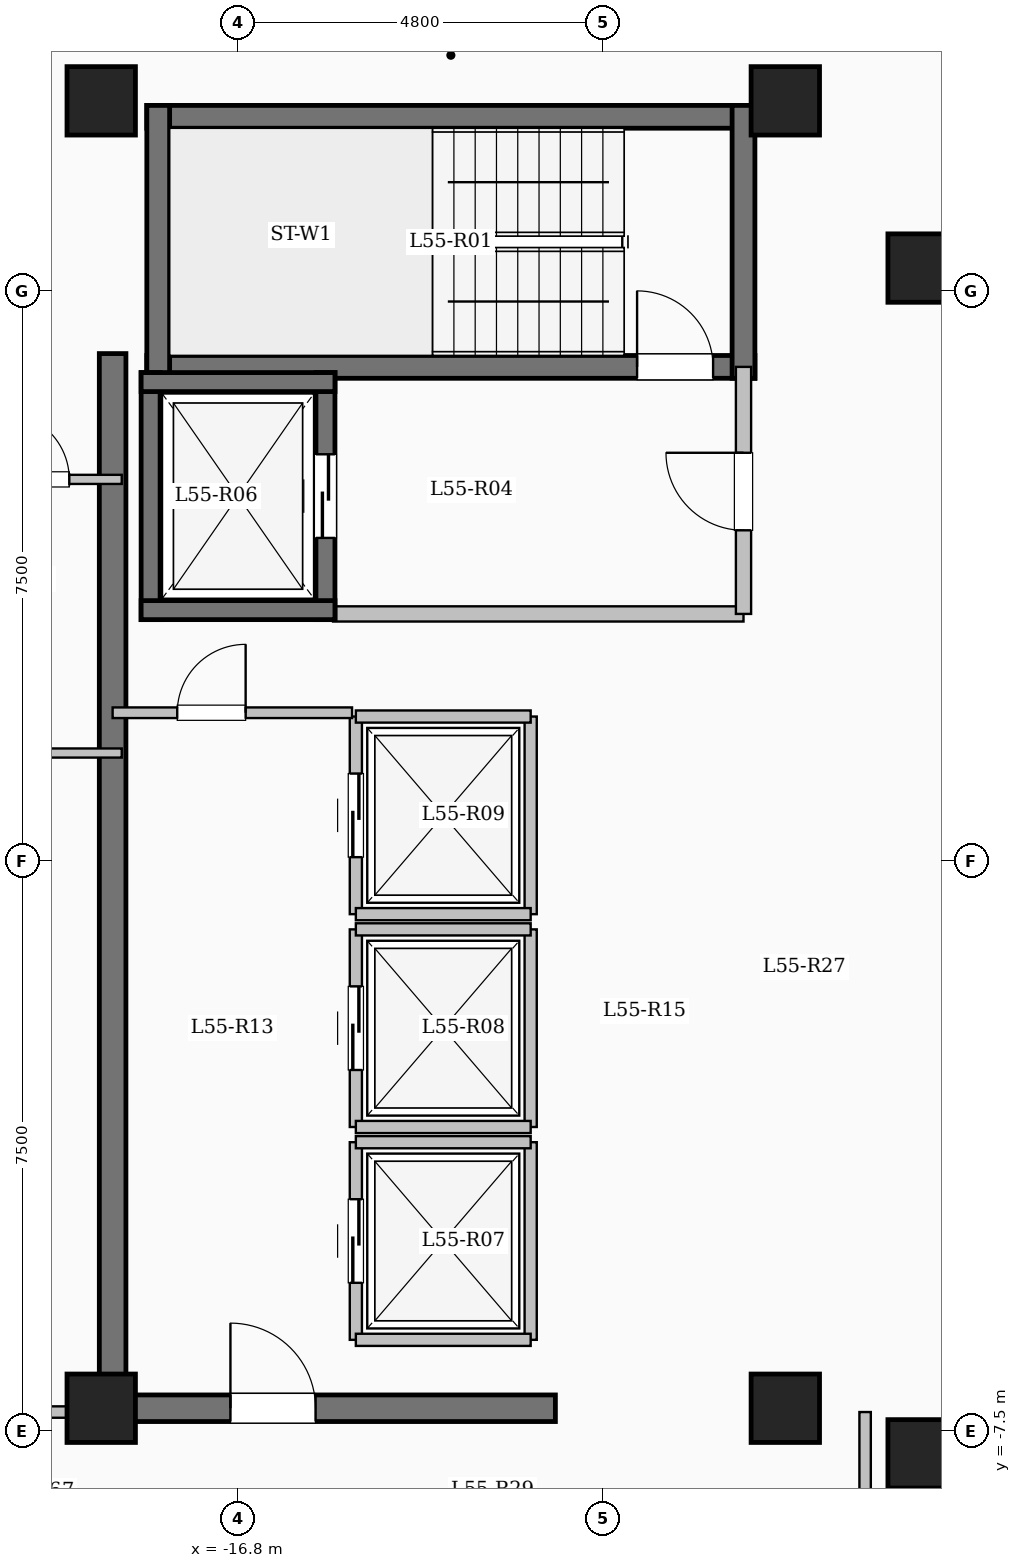
"""IFC4 building model, lengths in metres.
Left out: names, types, materials, properties, quantities, classifications, styles, units other than length and angle.
Written with IfcOpenShell. Run it as: python <this file> out.ifc"""

import sys

from ifc_helpers import new_model, si_unit, direction, frame, frame_2d, origin, origin_2d, place, context, subcontext, project, spatial, rectangle, extrude, element, fill, save


model = new_model("IFC4")
c1 = context("Model", 3, precision=1e-05, world=origin(), true_north=direction((0.0, 1.0)))
c2 = subcontext(c1, "Body", "Model", "MODEL_VIEW")
j1 = project(units=[si_unit("LENGTHUNIT", "METRE"), si_unit("PLANEANGLEUNIT", "RADIAN")], contexts=[c1])
p1 = place(None, origin())
s1 = spatial("IfcSite", under=j1, at=p1, CompositionType="ELEMENT")
p2 = place(p1, origin())
s2 = spatial("IfcBuilding", under=s1, at=p2, CompositionType="ELEMENT")
p3 = place(p2, frame((0.0, 0.0, 203.65)))
s3 = spatial("IfcBuildingStorey", under=s2, at=p3, CompositionType="ELEMENT", Elevation=203.65)
for number, where, z_axis, x_axis in (
    (1, (-7.8, -7.8, 0.0), (0.0, 0.0, 1.0), (1.0, 0.0, 0.0)),
    (2, (-7.8, 7.8, 0.0), (0.0, 0.0, 1.0), (1.0, 0.0, 0.0)),
    (3, (-9.6, -7.2, 0.0), (0.0, 0.0, 1.0), (1.0, 0.0, 0.0)),
    (4, (-9.6, 10.0, 0.0), (0.0, 0.0, 1.0), (1.0, 0.0, 0.0)),
    (5, (-18.6, -7.2, 0.0), (0.0, 0.0, 1.0), (1.0, 0.0, 0.0)),
    (6, (-18.6, 10.0, 0.0), (0.0, 0.0, 1.0), (1.0, 0.0, 0.0)),
):
    element("IfcColumn", number, at=place(p3, frame(where, z_axis=z_axis, x_axis=x_axis)), inside=s3, PredefinedType="COLUMN", context=c2, shape_type="SweptSolid", body=[
        extrude(rectangle(XDim=0.9, YDim=0.9, at=origin_2d()), origin(), (0.0, 0.0, 1.0), 3.35),
    ])
p4 = place(p3, frame((-18.0, 9.79, 0.0), z_axis=(0.0, 0.0, 1.0), x_axis=(1.0, 0.0, 0.0)))
e7 = element("IfcWall", 7, at=p4, inside=s3, PredefinedType="SHEAR", context=c2, shape_type="SweptSolid", body=[
    extrude(rectangle(XDim=8.0, YDim=0.3, at=frame_2d((4.0, 0.0))), origin(), (0.0, 0.0, 1.0), 3.35),
])
p5 = place(p3, frame((-18.0, 6.5, 0.0), z_axis=(0.0, 0.0, 1.0), x_axis=(1.0, 0.0, 0.0)))
e8 = element("IfcWall", 8, at=p5, inside=s3, PredefinedType="SHEAR", context=c2, shape_type="SweptSolid", body=[
    extrude(rectangle(XDim=8.0, YDim=0.3, at=frame_2d((4.0, 0.0))), origin(), (0.0, 0.0, 1.0), 3.35),
])
p6 = place(p5, frame((6.45, 0.0, 0.0)))
e9 = element("IfcOpeningElement", 9, at=p6, cuts=e8, PredefinedType="OPENING", context=c2, shape_type="SweptSolid", body=[
    extrude(rectangle(XDim=1.0, YDim=2.15, at=frame_2d((0.5, 1.075))), frame((0.0, 0.16, 0.0), z_axis=(0.0, -1.0, 0.0), x_axis=(1.0, 0.0, 0.0)), (0.0, 0.0, 1.0), 0.32),
])
for number, where, z_axis, x_axis in (
    (10, (-17.85, 6.35, 0.0), (0.0, 0.0, 1.0), (0.0, 1.0, 0.0)),
    (11, (-10.15, 6.35, 0.0), (0.0, 0.0, 1.0), (0.0, 1.0, 0.0)),
):
    element("IfcWall", number, at=place(p3, frame(where, z_axis=z_axis, x_axis=x_axis)), inside=s3, PredefinedType="SHEAR", context=c2, shape_type="SweptSolid", body=[
        extrude(rectangle(XDim=3.59, YDim=0.3, at=frame_2d((1.795, 0.0))), origin(), (0.0, 0.0, 1.0), 3.35),
    ])
p7 = place(p3, frame((-15.55, 3.25, 0.0), z_axis=(0.0, 0.0, 1.0), x_axis=(1.0, 0.0, 0.0)))
e12 = element("IfcWall", 12, at=p7, inside=s3, PredefinedType="SOLIDWALL", context=c2, shape_type="SweptSolid", body=[
    extrude(rectangle(XDim=5.4, YDim=0.2, at=frame_2d((2.7, 0.0))), origin(), (0.0, 0.0, 1.0), 3.1),
])
p8 = place(p3, frame((-10.15, 3.25, 0.0), z_axis=(0.0, 0.0, 1.0), x_axis=(0.0, 1.0, 0.0)))
e13 = element("IfcWall", 13, at=p8, inside=s3, PredefinedType="SOLIDWALL", context=c2, shape_type="SweptSolid", body=[
    extrude(rectangle(XDim=3.25, YDim=0.2, at=frame_2d((1.625, 0.0))), origin(), (0.0, 0.0, 1.0), 3.1),
])
p9 = place(p8, frame((1.1, 0.0, 0.0)))
e14 = element("IfcOpeningElement", 14, at=p9, cuts=e13, PredefinedType="OPENING", context=c2, shape_type="SweptSolid", body=[
    extrude(rectangle(XDim=1.02, YDim=2.15, at=frame_2d((0.51, 1.075))), frame((0.0, 0.11, 0.0), z_axis=(0.0, -1.0, 0.0), x_axis=(1.0, 0.0, 0.0)), (0.0, 0.0, 1.0), 0.22),
])
p10 = place(p3, frame((-17.95, 3.175, 0.0), z_axis=(0.0, 0.0, 1.0), x_axis=(0.0, 1.0, 0.0)))
e15 = element("IfcWall", 15, at=p10, inside=s3, PredefinedType="SHEAR", context=c2, shape_type="SweptSolid", body=[
    extrude(rectangle(XDim=3.25, YDim=0.25, at=frame_2d((1.625, 0.0))), origin(), (0.0, 0.0, 1.0), 3.35),
])
p11 = place(p3, frame((-15.65, 3.175, 0.0), z_axis=(0.0, 0.0, 1.0), x_axis=(0.0, 1.0, 0.0)))
e16 = element("IfcWall", 16, at=p11, inside=s3, PredefinedType="SHEAR", context=c2, shape_type="SweptSolid", body=[
    extrude(rectangle(XDim=3.25, YDim=0.25, at=frame_2d((1.625, 0.0))), origin(), (0.0, 0.0, 1.0), 3.35),
])
p12 = place(p11, frame((1.075, 0.0, 0.0)))
e17 = element("IfcOpeningElement", 17, at=p12, cuts=e16, PredefinedType="OPENING", context=c2, shape_type="SweptSolid", body=[
    extrude(rectangle(XDim=1.1, YDim=2.15, at=frame_2d((0.55, 1.075))), frame((0.0, 0.135, 0.0), z_axis=(0.0, -1.0, 0.0), x_axis=(1.0, 0.0, 0.0)), (0.0, 0.0, 1.0), 0.27),
])
for number, where, z_axis, x_axis in (
    (18, (-18.075, 3.3, 0.0), (0.0, 0.0, 1.0), (1.0, 0.0, 0.0)),
    (19, (-18.075, 6.3, 0.0), (0.0, 0.0, 1.0), (1.0, 0.0, 0.0)),
):
    element("IfcWall", number, at=place(p3, frame(where, z_axis=z_axis, x_axis=x_axis)), inside=s3, PredefinedType="SHEAR", context=c2, shape_type="SweptSolid", body=[
        extrude(rectangle(XDim=2.55, YDim=0.25, at=frame_2d((1.275, 0.0))), origin(), (0.0, 0.0, 1.0), 3.35),
    ])
p13 = place(p3, frame((-15.25, -6.3, 0.0), z_axis=(0.0, 0.0, 1.0), x_axis=(0.0, 1.0, 0.0)))
e20 = element("IfcWall", 20, at=p13, inside=s3, PredefinedType="SOLIDWALL", context=c2, shape_type="SweptSolid", body=[
    extrude(rectangle(XDim=2.6, YDim=0.16, at=frame_2d((1.3, 0.0))), origin(), (0.0, 0.0, 1.0), 3.1),
])
p14 = place(p13, frame((0.75, 0.0, 0.0)))
e21 = element("IfcOpeningElement", 21, at=p14, cuts=e20, PredefinedType="OPENING", context=c2, shape_type="SweptSolid", body=[
    extrude(rectangle(XDim=1.1, YDim=2.15, at=frame_2d((0.55, 1.075))), frame((0.0, 0.09, 0.0), z_axis=(0.0, -1.0, 0.0), x_axis=(1.0, 0.0, 0.0)), (0.0, 0.0, 1.0), 0.18),
])
p15 = place(p3, frame((-12.95, -6.3, 0.0), z_axis=(0.0, 0.0, 1.0), x_axis=(0.0, 1.0, 0.0)))
e22 = element("IfcWall", 22, at=p15, inside=s3, PredefinedType="SOLIDWALL", context=c2, shape_type="SweptSolid", body=[
    extrude(rectangle(XDim=2.6, YDim=0.16, at=frame_2d((1.3, 0.0))), origin(), (0.0, 0.0, 1.0), 3.1),
])
for number, where, z_axis, x_axis in (
    (23, (-15.25, -6.3, 0.0), (0.0, 0.0, 1.0), (1.0, 0.0, 0.0)),
    (24, (-15.25, -3.7, 0.0), (0.0, 0.0, 1.0), (1.0, 0.0, 0.0)),
):
    element("IfcWall", number, at=place(p3, frame(where, z_axis=z_axis, x_axis=x_axis)), inside=s3, PredefinedType="SOLIDWALL", context=c2, shape_type="SweptSolid", body=[
        extrude(rectangle(XDim=2.3, YDim=0.16, at=frame_2d((1.15, 0.0))), origin(), (0.0, 0.0, 1.0), 3.1),
    ])
p16 = place(p3, frame((-15.25, -3.5, 0.0), z_axis=(0.0, 0.0, 1.0), x_axis=(0.0, 1.0, 0.0)))
e25 = element("IfcWall", 25, at=p16, inside=s3, PredefinedType="SOLIDWALL", context=c2, shape_type="SweptSolid", body=[
    extrude(rectangle(XDim=2.6, YDim=0.16, at=frame_2d((1.3, 0.0))), origin(), (0.0, 0.0, 1.0), 3.1),
])
p17 = place(p16, frame((0.75, 0.0, 0.0)))
e26 = element("IfcOpeningElement", 26, at=p17, cuts=e25, PredefinedType="OPENING", context=c2, shape_type="SweptSolid", body=[
    extrude(rectangle(XDim=1.1, YDim=2.15, at=frame_2d((0.55, 1.075))), frame((0.0, 0.09, 0.0), z_axis=(0.0, -1.0, 0.0), x_axis=(1.0, 0.0, 0.0)), (0.0, 0.0, 1.0), 0.18),
])
p18 = place(p3, frame((-12.95, -3.5, 0.0), z_axis=(0.0, 0.0, 1.0), x_axis=(0.0, 1.0, 0.0)))
e27 = element("IfcWall", 27, at=p18, inside=s3, PredefinedType="SOLIDWALL", context=c2, shape_type="SweptSolid", body=[
    extrude(rectangle(XDim=2.6, YDim=0.16, at=frame_2d((1.3, 0.0))), origin(), (0.0, 0.0, 1.0), 3.1),
])
for number, where, z_axis, x_axis in (
    (28, (-15.25, -3.5, 0.0), (0.0, 0.0, 1.0), (1.0, 0.0, 0.0)),
    (29, (-15.25, -0.9, 0.0), (0.0, 0.0, 1.0), (1.0, 0.0, 0.0)),
):
    element("IfcWall", number, at=place(p3, frame(where, z_axis=z_axis, x_axis=x_axis)), inside=s3, PredefinedType="SOLIDWALL", context=c2, shape_type="SweptSolid", body=[
        extrude(rectangle(XDim=2.3, YDim=0.16, at=frame_2d((1.15, 0.0))), origin(), (0.0, 0.0, 1.0), 3.1),
    ])
p19 = place(p3, frame((-15.25, -0.7, 0.0), z_axis=(0.0, 0.0, 1.0), x_axis=(0.0, 1.0, 0.0)))
e30 = element("IfcWall", 30, at=p19, inside=s3, PredefinedType="SOLIDWALL", context=c2, shape_type="SweptSolid", body=[
    extrude(rectangle(XDim=2.6, YDim=0.16, at=frame_2d((1.3, 0.0))), origin(), (0.0, 0.0, 1.0), 3.1),
])
p20 = place(p19, frame((0.75, 0.0, 0.0)))
e31 = element("IfcOpeningElement", 31, at=p20, cuts=e30, PredefinedType="OPENING", context=c2, shape_type="SweptSolid", body=[
    extrude(rectangle(XDim=1.1, YDim=2.15, at=frame_2d((0.55, 1.075))), frame((0.0, 0.09, 0.0), z_axis=(0.0, -1.0, 0.0), x_axis=(1.0, 0.0, 0.0)), (0.0, 0.0, 1.0), 0.18),
])
p21 = place(p3, frame((-12.95, -0.7, 0.0), z_axis=(0.0, 0.0, 1.0), x_axis=(0.0, 1.0, 0.0)))
e32 = element("IfcWall", 32, at=p21, inside=s3, PredefinedType="SOLIDWALL", context=c2, shape_type="SweptSolid", body=[
    extrude(rectangle(XDim=2.6, YDim=0.16, at=frame_2d((1.3, 0.0))), origin(), (0.0, 0.0, 1.0), 3.1),
])
for number, where, z_axis, x_axis in (
    (33, (-15.25, -0.7, 0.0), (0.0, 0.0, 1.0), (1.0, 0.0, 0.0)),
    (34, (-15.25, 1.9, 0.0), (0.0, 0.0, 1.0), (1.0, 0.0, 0.0)),
):
    element("IfcWall", number, at=place(p3, frame(where, z_axis=z_axis, x_axis=x_axis)), inside=s3, PredefinedType="SOLIDWALL", context=c2, shape_type="SweptSolid", body=[
        extrude(rectangle(XDim=2.3, YDim=0.16, at=frame_2d((1.15, 0.0))), origin(), (0.0, 0.0, 1.0), 3.1),
    ])
p22 = place(p3, frame((-18.45, -7.375, 0.0), z_axis=(0.0, 0.0, 1.0), x_axis=(0.0, 1.0, 0.0)))
e35 = element("IfcWall", 35, at=p22, inside=s3, PredefinedType="SHEAR", context=c2, shape_type="SweptSolid", body=[
    extrude(rectangle(XDim=14.05, YDim=0.35, at=frame_2d((7.025, 0.0))), origin(), (0.0, 0.0, 1.0), 3.35),
])
p23 = place(p3, frame((-18.625, -7.2, 0.0), z_axis=(0.0, 0.0, 1.0), x_axis=(1.0, 0.0, 0.0)))
e36 = element("IfcWall", 36, at=p23, inside=s3, PredefinedType="SHEAR", context=c2, shape_type="SweptSolid", body=[
    extrude(rectangle(XDim=6.0, YDim=0.35, at=frame_2d((3.0, 0.0))), origin(), (0.0, 0.0, 1.0), 3.35),
])
p24 = place(p23, frame((1.725, 0.0, 0.0)))
e37 = element("IfcOpeningElement", 37, at=p24, cuts=e36, PredefinedType="OPENING", context=c2, shape_type="SweptSolid", body=[
    extrude(rectangle(XDim=1.12, YDim=2.15, at=frame_2d((0.56, 1.075))), frame((0.0, 0.185, 0.0), z_axis=(0.0, -1.0, 0.0), x_axis=(1.0, 0.0, 0.0)), (0.0, 0.0, 1.0), 0.37),
])
p25 = place(p3, frame((-18.45, 1.95, 0.0), z_axis=(0.0, 0.0, 1.0), x_axis=(1.0, 0.0, 0.0)))
e38 = element("IfcWall", 38, at=p25, inside=s3, PredefinedType="PARTITIONING", context=c2, shape_type="SweptSolid", body=[
    extrude(rectangle(XDim=3.15, YDim=0.14, at=frame_2d((1.575, 0.0))), origin(), (0.0, 0.0, 1.0), 3.1),
])
p26 = place(p25, frame((0.85, 0.0, 0.0)))
e39 = element("IfcOpeningElement", 39, at=p26, cuts=e38, PredefinedType="OPENING", context=c2, shape_type="SweptSolid", body=[
    extrude(rectangle(XDim=0.9, YDim=2.08, at=frame_2d((0.45, 1.04))), frame((0.0, 0.08, 0.0), z_axis=(0.0, -1.0, 0.0), x_axis=(1.0, 0.0, 0.0)), (0.0, 0.0, 1.0), 0.16),
])
p27 = place(p3, frame((-8.55, -9.4, 0.0), z_axis=(0.0, 0.0, 1.0), x_axis=(0.0, 1.0, 0.0)))
e40 = element("IfcWall", 40, at=p27, inside=s3, PredefinedType="PARTITIONING", context=c2, shape_type="SweptSolid", body=[
    extrude(rectangle(XDim=2.15, YDim=0.15, at=frame_2d((1.075, 0.0))), origin(), (0.0, 0.0, 1.0), 3.1),
])
p28 = place(p3, frame((-23.58, -7.25, 0.0), z_axis=(0.0, 0.0, 1.0), x_axis=(1.0, 0.0, 0.0)))
e41 = element("IfcWall", 41, at=p28, inside=s3, PredefinedType="PARTITIONING", context=c2, shape_type="SweptSolid", body=[
    extrude(rectangle(XDim=5.13, YDim=0.15, at=frame_2d((2.565, 0.0))), origin(), (0.0, 0.0, 1.0), 3.1),
])
p29 = place(p28, frame((2.18, 0.0, 0.0)))
e42 = element("IfcOpeningElement", 42, at=p29, cuts=e41, PredefinedType="OPENING", context=c2, shape_type="SweptSolid", body=[
    extrude(rectangle(XDim=0.96, YDim=2.15, at=frame_2d((0.48, 1.075))), frame((0.0, 0.085, 0.0), z_axis=(0.0, -1.0, 0.0), x_axis=(1.0, 0.0, 0.0)), (0.0, 0.0, 1.0), 0.17),
])
p30 = place(p3, frame((-23.7, 1.42, 0.0), z_axis=(0.0, 0.0, 1.0), x_axis=(1.0, 0.0, 0.0)))
e43 = element("IfcWall", 43, at=p30, inside=s3, PredefinedType="PARTITIONING", context=c2, shape_type="SweptSolid", body=[
    extrude(rectangle(XDim=5.37, YDim=0.12, at=frame_2d((2.685, 0.0))), origin(), (0.0, 0.0, 1.0), 3.1),
])
p31 = place(p30, frame((0.937, 0.0, 0.0)))
e44 = element("IfcOpeningElement", 44, at=p31, cuts=e43, PredefinedType="OPENING", context=c2, shape_type="SweptSolid", body=[
    extrude(rectangle(XDim=0.88, YDim=2.1, at=frame_2d((0.44, 1.05))), frame((0.0, 0.07, 0.0), z_axis=(0.0, -1.0, 0.0), x_axis=(1.0, 0.0, 0.0)), (0.0, 0.0, 1.0), 0.14),
])
p32 = place(p30, frame((3.452, 0.0, 0.0)))
e45 = element("IfcOpeningElement", 45, at=p32, cuts=e43, PredefinedType="OPENING", context=c2, shape_type="SweptSolid", body=[
    extrude(rectangle(XDim=0.88, YDim=2.1, at=frame_2d((0.44, 1.05))), frame((0.0, 0.07, 0.0), z_axis=(0.0, -1.0, 0.0), x_axis=(1.0, 0.0, 0.0)), (0.0, 0.0, 1.0), 0.14),
])
p33 = place(p3, frame((-23.7, 5.02, 0.0), z_axis=(0.0, 0.0, 1.0), x_axis=(1.0, 0.0, 0.0)))
e46 = element("IfcWall", 46, at=p33, inside=s3, PredefinedType="PARTITIONING", context=c2, shape_type="SweptSolid", body=[
    extrude(rectangle(XDim=5.37, YDim=0.12, at=frame_2d((2.685, 0.0))), origin(), (0.0, 0.0, 1.0), 3.1),
])
p34 = place(p33, frame((3.8, 0.0, 0.0)))
e47 = element("IfcOpeningElement", 47, at=p34, cuts=e46, PredefinedType="OPENING", context=c2, shape_type="SweptSolid", body=[
    extrude(rectangle(XDim=0.88, YDim=2.1, at=frame_2d((0.44, 1.05))), frame((0.0, 0.07, 0.0), z_axis=(0.0, -1.0, 0.0), x_axis=(1.0, 0.0, 0.0)), (0.0, 0.0, 1.0), 0.14),
])
p35 = place(p6, origin())
e48 = element("IfcDoor", 48, at=p35, inside=s3, OperationType="SINGLE_SWING_LEFT", PredefinedType="DOOR", context=c2, shape_type="SweptSolid", body=[
    extrude(rectangle(XDim=1.0, YDim=2.15, at=frame_2d((0.5, 1.075))), frame((0.0, 0.025, 0.0), z_axis=(0.0, -1.0, 0.0), x_axis=(1.0, 0.0, 0.0)), (0.0, 0.0, 1.0), 0.05),
])
fill(e9, e48)
p36 = place(p9, origin())
e49 = element("IfcDoor", 49, at=p36, inside=s3, OperationType="SINGLE_SWING_RIGHT", PredefinedType="DOOR", context=c2, shape_type="SweptSolid", body=[
    extrude(rectangle(XDim=1.02, YDim=2.15, at=frame_2d((0.51, 1.075))), frame((0.0, 0.025, 0.0), z_axis=(0.0, -1.0, 0.0), x_axis=(1.0, 0.0, 0.0)), (0.0, 0.0, 1.0), 0.05),
])
fill(e14, e49)
p37 = place(p12, origin())
e50 = element("IfcDoor", 50, at=p37, inside=s3, OperationType="SLIDING_TO_LEFT", PredefinedType="DOOR", context=c2, shape_type="SweptSolid", body=[
    extrude(rectangle(XDim=1.1, YDim=2.15, at=frame_2d((0.55, 1.075))), frame((0.0, 0.025, 0.0), z_axis=(0.0, -1.0, 0.0), x_axis=(1.0, 0.0, 0.0)), (0.0, 0.0, 1.0), 0.05),
])
fill(e17, e50)
p38 = place(p14, origin())
e51 = element("IfcDoor", 51, at=p38, inside=s3, OperationType="SLIDING_TO_LEFT", PredefinedType="DOOR", context=c2, shape_type="SweptSolid", body=[
    extrude(rectangle(XDim=1.1, YDim=2.15, at=frame_2d((0.55, 1.075))), frame((0.0, 0.025, 0.0), z_axis=(0.0, -1.0, 0.0), x_axis=(1.0, 0.0, 0.0)), (0.0, 0.0, 1.0), 0.05),
])
fill(e21, e51)
p39 = place(p17, origin())
e52 = element("IfcDoor", 52, at=p39, inside=s3, OperationType="SLIDING_TO_LEFT", PredefinedType="DOOR", context=c2, shape_type="SweptSolid", body=[
    extrude(rectangle(XDim=1.1, YDim=2.15, at=frame_2d((0.55, 1.075))), frame((0.0, 0.025, 0.0), z_axis=(0.0, -1.0, 0.0), x_axis=(1.0, 0.0, 0.0)), (0.0, 0.0, 1.0), 0.05),
])
fill(e26, e52)
p40 = place(p20, origin())
e53 = element("IfcDoor", 53, at=p40, inside=s3, OperationType="SLIDING_TO_LEFT", PredefinedType="DOOR", context=c2, shape_type="SweptSolid", body=[
    extrude(rectangle(XDim=1.1, YDim=2.15, at=frame_2d((0.55, 1.075))), frame((0.0, 0.025, 0.0), z_axis=(0.0, -1.0, 0.0), x_axis=(1.0, 0.0, 0.0)), (0.0, 0.0, 1.0), 0.05),
])
fill(e31, e53)
p41 = place(p24, origin())
e54 = element("IfcDoor", 54, at=p41, inside=s3, OperationType="SINGLE_SWING_LEFT", PredefinedType="DOOR", context=c2, shape_type="SweptSolid", body=[
    extrude(rectangle(XDim=1.12, YDim=2.15, at=frame_2d((0.56, 1.075))), frame((0.0, 0.025, 0.0), z_axis=(0.0, -1.0, 0.0), x_axis=(1.0, 0.0, 0.0)), (0.0, 0.0, 1.0), 0.05),
])
fill(e37, e54)
p42 = place(p26, origin())
e55 = element("IfcDoor", 55, at=p42, inside=s3, OperationType="SINGLE_SWING_RIGHT", PredefinedType="DOOR", context=c2, shape_type="SweptSolid", body=[
    extrude(rectangle(XDim=0.9, YDim=2.08, at=frame_2d((0.45, 1.04))), frame((0.0, 0.025, 0.0), z_axis=(0.0, -1.0, 0.0), x_axis=(1.0, 0.0, 0.0)), (0.0, 0.0, 1.0), 0.05),
])
fill(e39, e55)
p43 = place(p34, origin())
e56 = element("IfcDoor", 56, at=p43, inside=s3, OperationType="SINGLE_SWING_LEFT", PredefinedType="DOOR", context=c2, shape_type="SweptSolid", body=[
    extrude(rectangle(XDim=0.88, YDim=2.1, at=frame_2d((0.44, 1.05))), frame((0.0, 0.025, 0.0), z_axis=(0.0, -1.0, 0.0), x_axis=(1.0, 0.0, 0.0)), (0.0, 0.0, 1.0), 0.05),
])
fill(e47, e56)
save(model, sys.argv[1])
